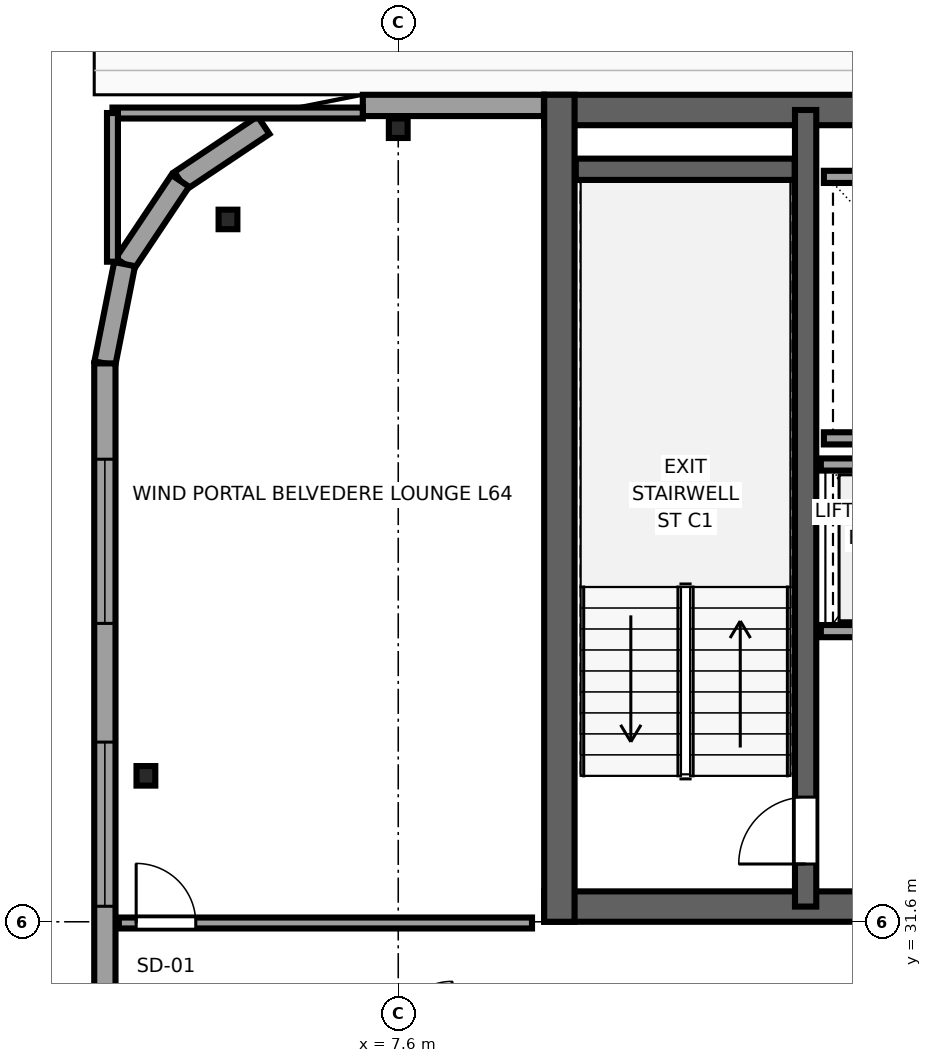
"""IFC4 building model, lengths in metres.
Left out: names, types, materials, properties, quantities, classifications, styles, units other than length and angle.
Written with IfcOpenShell. Run it as: python <this file> out.ifc"""

import sys

from ifc_helpers import new_model, si_unit, direction, frame, frame_2d, origin, origin_2d, place, context, subcontext, project, spatial, rectangle, i_section, extrude, source, transform, mapped, element, fill, save


model = new_model("IFC4")
c1 = context("Model", 3, precision=1e-05, world=origin(), true_north=direction((0.0, 1.0)))
c2 = subcontext(c1, "Body", "Model", "MODEL_VIEW")
j1 = project(units=[si_unit("LENGTHUNIT", "METRE"), si_unit("PLANEANGLEUNIT", "RADIAN")], contexts=[c1])
p1 = place(None, origin())
s1 = spatial("IfcSite", under=j1, at=p1, CompositionType="ELEMENT")
p2 = place(p1, origin())
s2 = spatial("IfcBuilding", under=s1, at=p2, CompositionType="ELEMENT")
p3 = place(p2, frame((0.0, 0.0, 241.65)))
s3 = spatial("IfcBuildingStorey", under=s2, at=p3, CompositionType="ELEMENT", Elevation=241.65)
p4 = place(p3, frame((10.0, 31.85, 0.0), z_axis=(0.0, 0.0, 1.0), x_axis=(1.0, 0.0, 0.0)))
e1 = element("IfcWall", 1, at=p4, inside=s3, PredefinedType="SHEAR", context=c2, shape_type="SweptSolid", body=[
    extrude(rectangle(XDim=26.0, YDim=0.5, at=frame_2d((13.0, 0.0))), origin(), (0.0, 0.0, 1.0), 3.55),
])
p5 = place(p4, frame((7.45, 0.0, 0.0), z_axis=(0.0, 0.0, 1.0), x_axis=(-1.0, 0.0, 0.0)))
e2 = element("IfcOpeningElement", 2, at=p5, cuts=e1, PredefinedType="OPENING", context=c2, shape_type="SweptSolid", body=[
    extrude(rectangle(XDim=1.5, YDim=2.04, at=frame_2d((0.75, 1.02))), frame((0.0, 0.26, 0.0), z_axis=(0.0, -1.0, 0.0), x_axis=(1.0, 0.0, 0.0)), (0.0, 0.0, 1.0), 0.52),
])
p6 = place(p4, frame((13.75, 0.0, 0.0), z_axis=(0.0, 0.0, 1.0), x_axis=(-1.0, 0.0, 0.0)))
e3 = element("IfcOpeningElement", 3, at=p6, cuts=e1, PredefinedType="OPENING", context=c2, shape_type="SweptSolid", body=[
    extrude(rectangle(XDim=1.5, YDim=2.04, at=frame_2d((0.75, 1.02))), frame((0.0, 0.26, 0.0), z_axis=(0.0, -1.0, 0.0), x_axis=(1.0, 0.0, 0.0)), (0.0, 0.0, 1.0), 0.52),
])
p7 = place(p4, frame((20.05, 0.0, 0.0), z_axis=(0.0, 0.0, 1.0), x_axis=(-1.0, 0.0, 0.0)))
e4 = element("IfcOpeningElement", 4, at=p7, cuts=e1, PredefinedType="OPENING", context=c2, shape_type="SweptSolid", body=[
    extrude(rectangle(XDim=1.5, YDim=2.04, at=frame_2d((0.75, 1.02))), frame((0.0, 0.26, 0.0), z_axis=(0.0, -1.0, 0.0), x_axis=(1.0, 0.0, 0.0)), (0.0, 0.0, 1.0), 0.52),
])
p8 = place(p3, frame((10.0, 44.95, 0.0), z_axis=(0.0, 0.0, 1.0), x_axis=(1.0, 0.0, 0.0)))
e5 = element("IfcWall", 5, at=p8, inside=s3, PredefinedType="SHEAR", context=c2, shape_type="SweptSolid", body=[
    extrude(rectangle(XDim=26.0, YDim=0.5, at=frame_2d((13.0, 0.0))), origin(), (0.0, 0.0, 1.0), 3.55),
])
p9 = place(p3, frame((10.25, 31.6, 0.0), z_axis=(0.0, 0.0, 1.0), x_axis=(0.0, 1.0, 0.0)))
e6 = element("IfcWall", 6, at=p9, inside=s3, PredefinedType="SHEAR", context=c2, shape_type="SweptSolid", body=[
    extrude(rectangle(XDim=13.6, YDim=0.5, at=frame_2d((6.8, 0.0))), origin(), (0.0, 0.0, 1.0), 3.55),
])
p10 = place(p3, frame((14.3, 31.85, 0.0), z_axis=(0.0, 0.0, 1.0), x_axis=(0.0, 1.0, 0.0)))
e7 = element("IfcWall", 7, at=p10, inside=s3, PredefinedType="SHEAR", context=c2, shape_type="SweptSolid", body=[
    extrude(rectangle(XDim=13.1, YDim=0.35, at=frame_2d((6.55, 0.0))), origin(), (0.0, 0.0, 1.0), 3.55),
])
p11 = place(p10, frame((0.7, 0.0, 0.0)))
e8 = element("IfcOpeningElement", 8, at=p11, cuts=e7, PredefinedType="OPENING", context=c2, shape_type="SweptSolid", body=[
    extrude(rectangle(XDim=1.1, YDim=2.12, at=frame_2d((0.55, 1.06))), frame((0.0, 0.185, 0.0), z_axis=(0.0, -1.0, 0.0), x_axis=(1.0, 0.0, 0.0)), (0.0, 0.0, 1.0), 0.37),
])
p12 = place(p3, frame((10.52, 43.975, 0.0), z_axis=(0.0, 0.0, 1.0), x_axis=(1.0, 0.0, 0.0)))
e9 = element("IfcWall", 9, at=p12, inside=s3, PredefinedType="SHEAR", context=c2, shape_type="SweptSolid", body=[
    extrude(rectangle(XDim=3.6, YDim=0.35, at=frame_2d((1.8, 0.0))), origin(), (0.0, 0.0, 1.0), 3.55),
])
m1 = source(origin(), c2, "Body", "SweptSolid", [
    extrude(i_section(OverallWidth=0.309, OverallDepth=0.321, WebThickness=0.014, FlangeThickness=0.022, FilletRadius=0.017, at=origin_2d()), origin(), (0.0, 0.0, 1.0), 3.55),
])
for number, where, z_axis, x_axis in (
    (10, (4.8, 43.15, 0.0), (0.0, 0.0, 1.0), (1.0, 0.0, 0.0)),
    (11, (7.6, 44.65, 0.0), (0.0, 0.0, 1.0), (1.0, 0.0, 0.0)),
    (12, (3.45, 34.0, 0.0), (0.0, 0.0, 1.0), (1.0, 0.0, 0.0)),
):
    element("IfcColumn", number, at=place(p3, frame(where, z_axis=z_axis, x_axis=x_axis)), inside=s3, PredefinedType="COLUMN", context=c2, shape_type="MappedRepresentation", body=[
        mapped(m1, transform((0.0, 0.0, 0.0), x_axis=(1.0, 0.0, 0.0), y_axis=(0.0, 1.0, 0.0), z_axis=(0.0, 0.0, 1.0), scale=1.0)),
    ])
p13 = place(p3, frame((9.996, 45.025, 0.0), z_axis=(0.0, 0.0, 1.0), x_axis=(-1.0, 0.0, 0.0)))
e13 = element("IfcWall", 13, at=p13, inside=s3, PredefinedType="SOLIDWALL", context=c2, shape_type="SweptSolid", body=[
    extrude(rectangle(XDim=2.979, YDim=0.35, at=frame_2d((1.49, 0.0))), origin(), (0.0, 0.0, 1.0), 2.16),
])
for number, where, z_axis, x_axis in (
    (14, (5.385, 44.7, 0.0), (0.0, 0.0, 1.0), (-0.832, -0.556, 0.0)),
    (15, (4.015, 43.785, 0.0), (0.0, 0.0, 1.0), (-0.556, -0.831, 0.0)),
):
    element("IfcWall", number, at=place(p3, frame(where, z_axis=z_axis, x_axis=x_axis)), inside=s3, PredefinedType="SOLIDWALL", context=c2, shape_type="SweptSolid", body=[
        extrude(rectangle(XDim=1.647, YDim=0.35, at=frame_2d((0.824, 0.0))), origin(), (0.0, 0.0, 1.0), 2.9),
    ])
p14 = place(p3, frame((3.1, 42.416, 0.0), z_axis=(0.0, 0.0, 1.0), x_axis=(-0.195044345786, -0.980794424524, 0.0)))
e16 = element("IfcWall", 16, at=p14, inside=s3, PredefinedType="SOLIDWALL", context=c2, shape_type="SweptSolid", body=[
    extrude(rectangle(XDim=1.665, YDim=0.35, at=frame_2d((0.833, 0.0))), origin(), (0.0, 0.0, 1.0), 3.37),
])
p15 = place(p3, frame((2.775, 40.783, 0.0), z_axis=(0.0, 0.0, 1.0), x_axis=(0.0, -1.0, 0.0)))
e17 = element("IfcWall", 17, at=p15, inside=s3, PredefinedType="SOLIDWALL", context=c2, shape_type="SweptSolid", body=[
    extrude(rectangle(XDim=33.766, YDim=0.35, at=frame_2d((16.883, 0.0))), origin(), (0.0, 0.0, 1.0), 3.37),
])
p16 = place(p15, frame((1.576, 0.0, 0.68)))
e18 = element("IfcOpeningElement", 18, at=p16, cuts=e17, PredefinedType="OPENING", context=c2, shape_type="SweptSolid", body=[
    extrude(rectangle(XDim=2.7, YDim=1.95, at=frame_2d((1.35, 0.975))), frame((0.0, 0.185, 0.0), z_axis=(0.0, -1.0, 0.0), x_axis=(1.0, 0.0, 0.0)), (0.0, 0.0, 1.0), 0.37),
])
p17 = place(p15, frame((6.228, 0.0, 0.68)))
e19 = element("IfcOpeningElement", 19, at=p17, cuts=e17, PredefinedType="OPENING", context=c2, shape_type="SweptSolid", body=[
    extrude(rectangle(XDim=2.7, YDim=1.95, at=frame_2d((1.35, 0.975))), frame((0.0, 0.185, 0.0), z_axis=(0.0, -1.0, 0.0), x_axis=(1.0, 0.0, 0.0)), (0.0, 0.0, 1.0), 0.37),
])
p18 = place(p15, frame((11.431, 0.0, 0.68)))
e20 = element("IfcOpeningElement", 20, at=p18, cuts=e17, PredefinedType="OPENING", context=c2, shape_type="SweptSolid", body=[
    extrude(rectangle(XDim=2.7, YDim=1.95, at=frame_2d((1.35, 0.975))), frame((0.0, 0.185, 0.0), z_axis=(0.0, -1.0, 0.0), x_axis=(1.0, 0.0, 0.0)), (0.0, 0.0, 1.0), 0.37),
])
p19 = place(p15, frame((15.533, 0.0, 0.68)))
e21 = element("IfcOpeningElement", 21, at=p19, cuts=e17, PredefinedType="OPENING", context=c2, shape_type="SweptSolid", body=[
    extrude(rectangle(XDim=2.7, YDim=1.95, at=frame_2d((1.35, 0.975))), frame((0.0, 0.185, 0.0), z_axis=(0.0, -1.0, 0.0), x_axis=(1.0, 0.0, 0.0)), (0.0, 0.0, 1.0), 0.37),
])
p20 = place(p15, frame((20.185, 0.0, 0.68)))
e22 = element("IfcOpeningElement", 22, at=p20, cuts=e17, PredefinedType="OPENING", context=c2, shape_type="SweptSolid", body=[
    extrude(rectangle(XDim=2.7, YDim=1.95, at=frame_2d((1.35, 0.975))), frame((0.0, 0.185, 0.0), z_axis=(0.0, -1.0, 0.0), x_axis=(1.0, 0.0, 0.0)), (0.0, 0.0, 1.0), 0.37),
])
p21 = place(p15, frame((24.837, 0.0, 0.68)))
e23 = element("IfcOpeningElement", 23, at=p21, cuts=e17, PredefinedType="OPENING", context=c2, shape_type="SweptSolid", body=[
    extrude(rectangle(XDim=2.7, YDim=1.95, at=frame_2d((1.35, 0.975))), frame((0.0, 0.185, 0.0), z_axis=(0.0, -1.0, 0.0), x_axis=(1.0, 0.0, 0.0)), (0.0, 0.0, 1.0), 0.37),
])
p22 = place(p15, frame((29.489, 0.0, 0.68)))
e24 = element("IfcOpeningElement", 24, at=p22, cuts=e17, PredefinedType="OPENING", context=c2, shape_type="SweptSolid", body=[
    extrude(rectangle(XDim=2.7, YDim=1.95, at=frame_2d((1.35, 0.975))), frame((0.0, 0.185, 0.0), z_axis=(0.0, -1.0, 0.0), x_axis=(1.0, 0.0, 0.0)), (0.0, 0.0, 1.0), 0.37),
])
for number, where, z_axis, x_axis in (
    (25, (14.6, 39.55, 0.0), (0.0, 0.0, 1.0), (1.0, 0.0, 0.0)),
    (26, (14.6, 43.85, 0.0), (0.0, 0.0, 1.0), (1.0, 0.0, 0.0)),
):
    element("IfcWall", number, at=place(p3, frame(where, z_axis=z_axis, x_axis=x_axis)), inside=s3, PredefinedType="SOLIDWALL", context=c2, shape_type="SweptSolid", body=[
        extrude(rectangle(XDim=4.1, YDim=0.2, at=frame_2d((2.05, 0.0))), origin(), (0.0, 0.0, 1.0), 3.37),
    ])
p23 = place(p3, frame((14.55, 36.38, 0.0), z_axis=(0.0, 0.0, 1.0), x_axis=(1.0, 0.0, 0.0)))
e27 = element("IfcWall", 27, at=p23, inside=s3, PredefinedType="SOLIDWALL", context=c2, shape_type="SweptSolid", body=[
    extrude(rectangle(XDim=4.075, YDim=0.2, at=frame_2d((2.038, 0.0))), origin(), (0.0, 0.0, 1.0), 3.37),
])
p24 = place(p23, frame((0.55, 0.0, 0.0)))
e28 = element("IfcOpeningElement", 28, at=p24, cuts=e27, PredefinedType="OPENING", context=c2, shape_type="SweptSolid", body=[
    extrude(rectangle(XDim=1.1, YDim=2.12, at=frame_2d((0.55, 1.06))), frame((0.0, 0.11, 0.0), z_axis=(0.0, -1.0, 0.0), x_axis=(1.0, 0.0, 0.0)), (0.0, 0.0, 1.0), 0.22),
])
p25 = place(p23, frame((2.45, 0.0, 0.0)))
e29 = element("IfcOpeningElement", 29, at=p25, cuts=e27, PredefinedType="OPENING", context=c2, shape_type="SweptSolid", body=[
    extrude(rectangle(XDim=1.1, YDim=2.12, at=frame_2d((0.55, 1.06))), frame((0.0, 0.11, 0.0), z_axis=(0.0, -1.0, 0.0), x_axis=(1.0, 0.0, 0.0)), (0.0, 0.0, 1.0), 0.22),
])
p26 = place(p3, frame((14.55, 39.12, 0.0), z_axis=(0.0, 0.0, 1.0), x_axis=(1.0, 0.0, 0.0)))
e30 = element("IfcWall", 30, at=p26, inside=s3, PredefinedType="SOLIDWALL", context=c2, shape_type="SweptSolid", body=[
    extrude(rectangle(XDim=4.075, YDim=0.2, at=frame_2d((2.038, 0.0))), origin(), (0.0, 0.0, 1.0), 3.37),
])
p27 = place(p3, frame((3.005, 31.58, 0.0), z_axis=(0.0, 0.0, 1.0), x_axis=(1.0, 0.0, 0.0)))
e31 = element("IfcWall", 31, at=p27, inside=s3, PredefinedType="PARTITIONING", context=c2, shape_type="SweptSolid", body=[
    extrude(rectangle(XDim=6.795, YDim=0.18, at=frame_2d((3.397, 0.0))), origin(), (0.0, 0.0, 1.0), 3.37),
])
p28 = place(p27, frame((0.285, 0.0, 0.0)))
e32 = element("IfcOpeningElement", 32, at=p28, cuts=e31, PredefinedType="OPENING", context=c2, shape_type="SweptSolid", body=[
    extrude(rectangle(XDim=0.98, YDim=2.12, at=frame_2d((0.49, 1.06))), frame((0.0, 0.1, 0.0), z_axis=(0.0, -1.0, 0.0), x_axis=(1.0, 0.0, 0.0)), (0.0, 0.0, 1.0), 0.2),
])
p29 = place(p3, frame((2.9, 44.9, 0.0), z_axis=(0.0, 0.0, 1.0), x_axis=(1.0, 0.0, 0.0)))
e33 = element("IfcWall", 33, at=p29, inside=s3, PredefinedType="PARTITIONING", context=c2, shape_type="SweptSolid", body=[
    extrude(rectangle(XDim=4.117, YDim=0.18, at=frame_2d((2.059, 0.0))), origin(), (0.0, 0.0, 1.0), 3.37),
])
p30 = place(p3, frame((2.9, 42.455, 0.0), z_axis=(0.0, 0.0, 1.0), x_axis=(0.0, 1.0, 0.0)))
e34 = element("IfcWall", 34, at=p30, inside=s3, PredefinedType="PARTITIONING", context=c2, shape_type="SweptSolid", body=[
    extrude(rectangle(XDim=2.445, YDim=0.18, at=frame_2d((1.222, 0.0))), origin(), (0.0, 0.0, 1.0), 3.37),
])
m2 = source(origin(), c2, "Body", "SweptSolid", [
    extrude(rectangle(XDim=2.7, YDim=1.95, at=frame_2d((1.35, 0.975))), frame((0.0, 0.09, 0.0), z_axis=(0.0, -1.0, 0.0), x_axis=(1.0, 0.0, 0.0)), (0.0, 0.0, 1.0), 0.06),
])
p31 = place(p16, origin())
e35 = element("IfcWindow", 35, at=p31, inside=s3, PartitioningType="TRIPLE_PANEL_HORIZONTAL", PredefinedType="WINDOW", context=c2, shape_type="MappedRepresentation", body=[
    mapped(m2, transform((0.0, 0.0, 0.0), x_axis=(1.0, 0.0, 0.0), y_axis=(0.0, 1.0, 0.0), z_axis=(0.0, 0.0, 1.0), scale=1.0)),
])
fill(e18, e35)
p32 = place(p17, origin())
e36 = element("IfcWindow", 36, at=p32, inside=s3, PartitioningType="TRIPLE_PANEL_HORIZONTAL", PredefinedType="WINDOW", context=c2, shape_type="MappedRepresentation", body=[
    mapped(m2, transform((0.0, 0.0, 0.0), x_axis=(1.0, 0.0, 0.0), y_axis=(0.0, 1.0, 0.0), z_axis=(0.0, 0.0, 1.0), scale=1.0)),
])
fill(e19, e36)
m3 = source(origin(), c2, "Body", "SweptSolid", [
    extrude(rectangle(XDim=1.1, YDim=2.12, at=frame_2d((0.55, 1.06))), frame((0.0, 0.025, 0.0), z_axis=(0.0, -1.0, 0.0), x_axis=(1.0, 0.0, 0.0)), (0.0, 0.0, 1.0), 0.05),
])
p33 = place(p11, origin())
e37 = element("IfcDoor", 37, at=p33, inside=s3, OperationType="SINGLE_SWING_LEFT", PredefinedType="DOOR", context=c2, shape_type="MappedRepresentation", body=[
    mapped(m3, transform((0.0, 0.0, 0.0), x_axis=(1.0, 0.0, 0.0), y_axis=(0.0, 1.0, 0.0), z_axis=(0.0, 0.0, 1.0), scale=1.0)),
])
fill(e8, e37)
m4 = source(origin(), c2, "Body", "SweptSolid", [
    extrude(rectangle(XDim=0.98, YDim=2.12, at=frame_2d((0.49, 1.06))), frame((0.0, 0.025, 0.0), z_axis=(0.0, -1.0, 0.0), x_axis=(1.0, 0.0, 0.0)), (0.0, 0.0, 1.0), 0.05),
])
p34 = place(p28, origin())
e38 = element("IfcDoor", 38, at=p34, inside=s3, OperationType="SINGLE_SWING_LEFT", PredefinedType="DOOR", context=c2, shape_type="MappedRepresentation", body=[
    mapped(m4, transform((0.0, 0.0, 0.0), x_axis=(1.0, 0.0, 0.0), y_axis=(0.0, 1.0, 0.0), z_axis=(0.0, 0.0, 1.0), scale=1.0)),
])
fill(e32, e38)
save(model, sys.argv[1])
